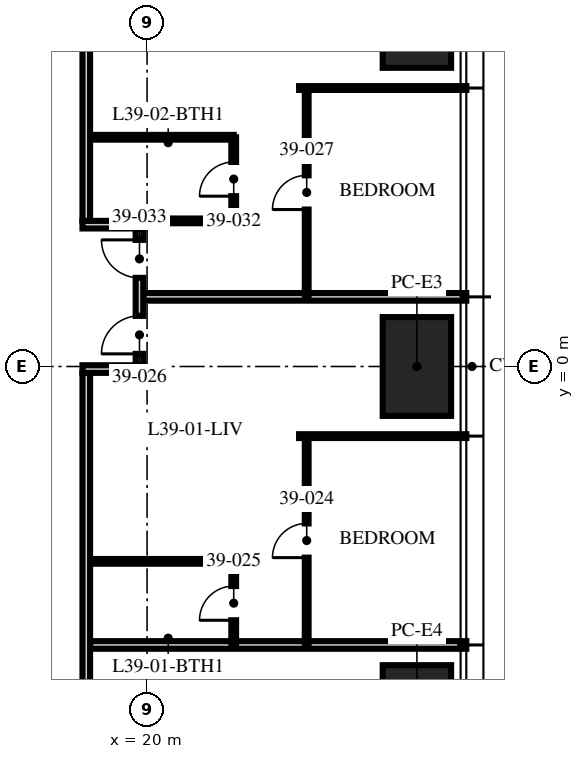
"""IFC4 building model, lengths in metres.
Left out: names, types, materials, properties, quantities, classifications, styles, units other than length and angle.
Written with IfcOpenShell. Run it as: python <this file> out.ifc"""

import sys

from ifc_helpers import new_model, si_unit, direction, frame, frame_2d, origin, origin_2d, place, context, subcontext, project, spatial, rectangle, extrude, element, fill, save


model = new_model("IFC4")
c1 = context("Model", 3, precision=1e-05, world=origin(), true_north=direction((0.0, 1.0)))
c2 = subcontext(c1, "Body", "Model", "MODEL_VIEW")
j1 = project(units=[si_unit("LENGTHUNIT", "METRE"), si_unit("PLANEANGLEUNIT", "RADIAN")], contexts=[c1])
p1 = place(None, origin())
s1 = spatial("IfcSite", under=j1, at=p1, CompositionType="ELEMENT")
p2 = place(p1, origin())
s2 = spatial("IfcBuilding", under=s1, at=p2, CompositionType="ELEMENT")
p3 = place(p2, frame((0.0, 0.0, 156.0)))
s3 = spatial("IfcBuildingStorey", under=s2, at=p3, CompositionType="ELEMENT", Elevation=156.0)
for number, where, z_axis, x_axis in (
    (1, (27.1, 9.16, 0.0), (0.0, 0.0, 1.0), (0.0, 1.0, 0.0)),
    (2, (27.1, 0.0, 0.0), (0.0, 0.0, 1.0), (0.0, 1.0, 0.0)),
    (3, (27.1, -9.16, 0.0), (0.0, 0.0, 1.0), (0.0, 1.0, 0.0)),
):
    element("IfcColumn", number, at=place(p3, frame(where, z_axis=z_axis, x_axis=x_axis)), inside=s3, PredefinedType="COLUMN", context=c2, shape_type="SweptSolid", body=[
        extrude(rectangle(XDim=2.6, YDim=1.8, at=origin_2d()), origin(), (0.0, 0.0, 1.0), 3.75),
    ])
p4 = place(p3, frame((18.5, -7.328, 0.0), z_axis=(0.0, 0.0, 1.0), x_axis=(1.0, 0.0, 0.0)))
e4 = element("IfcWall", 4, at=p4, inside=s3, PredefinedType="PARTITIONING", context=c2, shape_type="SweptSolid", body=[
    extrude(rectangle(XDim=9.9, YDim=0.2, at=frame_2d((4.95, 0.0))), origin(), (0.0, 0.0, 1.0), 2.81),
])
p5 = place(p3, frame((24.0, -1.832, 0.0), z_axis=(0.0, 0.0, 1.0), x_axis=(1.0, 0.0, 0.0)))
e5 = element("IfcWall", 5, at=p5, inside=s3, PredefinedType="PARTITIONING", context=c2, shape_type="SweptSolid", body=[
    extrude(rectangle(XDim=4.4, YDim=0.1, at=frame_2d((2.2, 0.0))), origin(), (0.0, 0.0, 1.0), 2.81),
])
p6 = place(p3, frame((19.9, 1.832, 0.0), z_axis=(0.0, 0.0, 1.0), x_axis=(1.0, 0.0, 0.0)))
e6 = element("IfcWall", 6, at=p6, inside=s3, PredefinedType="PARTITIONING", context=c2, shape_type="SweptSolid", body=[
    extrude(rectangle(XDim=8.5, YDim=0.2, at=frame_2d((4.25, 0.0))), origin(), (0.0, 0.0, 1.0), 2.81),
])
p7 = place(p3, frame((24.0, 7.328, 0.0), z_axis=(0.0, 0.0, 1.0), x_axis=(1.0, 0.0, 0.0)))
e7 = element("IfcWall", 7, at=p7, inside=s3, PredefinedType="PARTITIONING", context=c2, shape_type="SweptSolid", body=[
    extrude(rectangle(XDim=4.4, YDim=0.1, at=frame_2d((2.2, 0.0))), origin(), (0.0, 0.0, 1.0), 2.81),
])
p8 = place(p3, frame((24.2, -7.328, 0.0), z_axis=(0.0, 0.0, 1.0), x_axis=(0.0, 1.0, 0.0)))
e8 = element("IfcWall", 8, at=p8, inside=s3, PredefinedType="PARTITIONING", context=c2, shape_type="SweptSolid", body=[
    extrude(rectangle(XDim=5.496, YDim=0.1, at=frame_2d((2.748, 0.0))), origin(), (0.0, 0.0, 1.0), 2.81),
])
p9 = place(p8, frame((2.298, 0.0, 0.0)))
e9 = element("IfcOpeningElement", 9, at=p9, cuts=e8, PredefinedType="OPENING", context=c2, shape_type="SweptSolid", body=[
    extrude(rectangle(XDim=0.9, YDim=2.1, at=frame_2d((0.45, 1.05))), frame((0.0, 0.06, 0.0), z_axis=(0.0, -1.0, 0.0), x_axis=(1.0, 0.0, 0.0)), (0.0, 0.0, 1.0), 0.12),
])
p10 = place(p3, frame((22.28, -7.328, 0.0), z_axis=(0.0, 0.0, 1.0), x_axis=(0.0, 1.0, 0.0)))
e10 = element("IfcWall", 10, at=p10, inside=s3, PredefinedType="PARTITIONING", context=c2, shape_type="SweptSolid", body=[
    extrude(rectangle(XDim=2.2, YDim=0.125, at=frame_2d((1.1, 0.0))), origin(), (0.0, 0.0, 1.0), 3.5),
])
p11 = place(p10, frame((0.65, 0.0, 0.0)))
e11 = element("IfcOpeningElement", 11, at=p11, cuts=e10, PredefinedType="OPENING", context=c2, shape_type="SweptSolid", body=[
    extrude(rectangle(XDim=0.9, YDim=2.1, at=frame_2d((0.45, 1.05))), frame((0.0, 0.073, 0.0), z_axis=(0.0, -1.0, 0.0), x_axis=(1.0, 0.0, 0.0)), (0.0, 0.0, 1.0), 0.145),
])
p12 = place(p3, frame((18.5, -5.128, 0.0), z_axis=(0.0, 0.0, 1.0), x_axis=(1.0, 0.0, 0.0)))
e12 = element("IfcWall", 12, at=p12, inside=s3, PredefinedType="PARTITIONING", context=c2, shape_type="SweptSolid", body=[
    extrude(rectangle(XDim=3.78, YDim=0.125, at=frame_2d((1.89, 0.0))), origin(), (0.0, 0.0, 1.0), 3.5),
])
p13 = place(p3, frame((24.2, 1.832, 0.0), z_axis=(0.0, 0.0, 1.0), x_axis=(0.0, 1.0, 0.0)))
e13 = element("IfcWall", 13, at=p13, inside=s3, PredefinedType="PARTITIONING", context=c2, shape_type="SweptSolid", body=[
    extrude(rectangle(XDim=5.496, YDim=0.1, at=frame_2d((2.748, 0.0))), origin(), (0.0, 0.0, 1.0), 2.81),
])
p14 = place(p13, frame((2.298, 0.0, 0.0)))
e14 = element("IfcOpeningElement", 14, at=p14, cuts=e13, PredefinedType="OPENING", context=c2, shape_type="SweptSolid", body=[
    extrude(rectangle(XDim=0.9, YDim=2.1, at=frame_2d((0.45, 1.05))), frame((0.0, 0.06, 0.0), z_axis=(0.0, -1.0, 0.0), x_axis=(1.0, 0.0, 0.0)), (0.0, 0.0, 1.0), 0.12),
])
p15 = place(p3, frame((22.28, 3.832, 0.0), z_axis=(0.0, 0.0, 1.0), x_axis=(0.0, 1.0, 0.0)))
e15 = element("IfcWall", 15, at=p15, inside=s3, PredefinedType="PARTITIONING", context=c2, shape_type="SweptSolid", body=[
    extrude(rectangle(XDim=2.2, YDim=0.125, at=frame_2d((1.1, 0.0))), origin(), (0.0, 0.0, 1.0), 2.81),
])
p16 = place(p15, frame((0.65, 0.0, 0.0)))
e16 = element("IfcOpeningElement", 16, at=p16, cuts=e15, PredefinedType="OPENING", context=c2, shape_type="SweptSolid", body=[
    extrude(rectangle(XDim=0.9, YDim=2.1, at=frame_2d((0.45, 1.05))), frame((0.0, 0.073, 0.0), z_axis=(0.0, -1.0, 0.0), x_axis=(1.0, 0.0, 0.0)), (0.0, 0.0, 1.0), 0.145),
])
p17 = place(p3, frame((19.97, 3.832, 0.0), z_axis=(0.0, 0.0, 1.0), x_axis=(1.0, 0.0, 0.0)))
e17 = element("IfcWall", 17, at=p17, inside=s3, PredefinedType="PARTITIONING", context=c2, shape_type="SweptSolid", body=[
    extrude(rectangle(XDim=2.31, YDim=0.125, at=frame_2d((1.155, 0.0))), origin(), (0.0, 0.0, 1.0), 3.5),
])
p18 = place(p3, frame((18.5, 6.032, 0.0), z_axis=(0.0, 0.0, 1.0), x_axis=(1.0, 0.0, 0.0)))
e18 = element("IfcWall", 18, at=p18, inside=s3, PredefinedType="PARTITIONING", context=c2, shape_type="SweptSolid", body=[
    extrude(rectangle(XDim=3.78, YDim=0.125, at=frame_2d((1.89, 0.0))), origin(), (0.0, 0.0, 1.0), 3.5),
])
p19 = place(p3, frame((18.4, -18.3, 0.0), z_axis=(0.0, 0.0, 1.0), x_axis=(0.0, 1.0, 0.0)))
e19 = element("IfcWall", 19, at=p19, inside=s3, PredefinedType="PARTITIONING", context=c2, shape_type="SweptSolid", body=[
    extrude(rectangle(XDim=18.132, YDim=0.2, at=frame_2d((9.066, 0.0))), origin(), (0.0, 0.0, 1.0), 2.3),
])
p20 = place(p3, frame((18.3, -0.068, 0.0), z_axis=(0.0, 0.0, 1.0), x_axis=(1.0, 0.0, 0.0)))
e20 = element("IfcWall", 20, at=p20, inside=s3, PredefinedType="PARTITIONING", context=c2, shape_type="SweptSolid", body=[
    extrude(rectangle(XDim=1.6, YDim=0.2, at=frame_2d((0.8, 0.0))), origin(), (0.0, 0.0, 1.0), 2.7),
])
p21 = place(p3, frame((18.3, 3.732, 0.0), z_axis=(0.0, 0.0, 1.0), x_axis=(1.0, 0.0, 0.0)))
e21 = element("IfcWall", 21, at=p21, inside=s3, PredefinedType="PARTITIONING", context=c2, shape_type="SweptSolid", body=[
    extrude(rectangle(XDim=1.6, YDim=0.2, at=frame_2d((0.8, 0.0))), origin(), (0.0, 0.0, 1.0), 3.5),
])
p22 = place(p3, frame((19.8, 0.032, 0.0), z_axis=(0.0, 0.0, 1.0), x_axis=(0.0, 1.0, 0.0)))
e22 = element("IfcWall", 22, at=p22, inside=s3, PredefinedType="PARTITIONING", context=c2, shape_type="SweptSolid", body=[
    extrude(rectangle(XDim=3.6, YDim=0.2, at=frame_2d((1.8, 0.0))), origin(), (0.0, 0.0, 1.0), 2.7),
])
p23 = place(p22, frame((0.3, 0.0, 0.0)))
e23 = element("IfcOpeningElement", 23, at=p23, cuts=e22, PredefinedType="OPENING", context=c2, shape_type="SweptSolid", body=[
    extrude(rectangle(XDim=1.0, YDim=2.2, at=frame_2d((0.5, 1.1))), frame((0.0, 0.11, 0.0), z_axis=(0.0, -1.0, 0.0), x_axis=(1.0, 0.0, 0.0)), (0.0, 0.0, 1.0), 0.22),
])
p24 = place(p22, frame((2.3, 0.0, 0.0)))
e24 = element("IfcOpeningElement", 24, at=p24, cuts=e22, PredefinedType="OPENING", context=c2, shape_type="SweptSolid", body=[
    extrude(rectangle(XDim=1.0, YDim=2.2, at=frame_2d((0.5, 1.1))), frame((0.0, 0.11, 0.0), z_axis=(0.0, -1.0, 0.0), x_axis=(1.0, 0.0, 0.0)), (0.0, 0.0, 1.0), 0.22),
])
p25 = place(p3, frame((18.4, 3.832, 0.0), z_axis=(0.0, 0.0, 1.0), x_axis=(0.0, 1.0, 0.0)))
e25 = element("IfcWall", 25, at=p25, inside=s3, PredefinedType="PARTITIONING", context=c2, shape_type="SweptSolid", body=[
    extrude(rectangle(XDim=12.868, YDim=0.2, at=frame_2d((6.434, 0.0))), origin(), (0.0, 0.0, 1.0), 2.7),
])
p26 = place(p9, origin())
e26 = element("IfcDoor", 26, at=p26, inside=s3, OperationType="SINGLE_SWING_LEFT", PredefinedType="DOOR", context=c2, shape_type="SweptSolid", body=[
    extrude(rectangle(XDim=0.9, YDim=2.1, at=frame_2d((0.45, 1.05))), frame((0.0, 0.025, 0.0), z_axis=(0.0, -1.0, 0.0), x_axis=(1.0, 0.0, 0.0)), (0.0, 0.0, 1.0), 0.05),
])
fill(e9, e26)
p27 = place(p11, origin())
e27 = element("IfcDoor", 27, at=p27, inside=s3, OperationType="SINGLE_SWING_LEFT", PredefinedType="DOOR", context=c2, shape_type="SweptSolid", body=[
    extrude(rectangle(XDim=0.9, YDim=2.1, at=frame_2d((0.45, 1.05))), frame((0.0, 0.025, 0.0), z_axis=(0.0, -1.0, 0.0), x_axis=(1.0, 0.0, 0.0)), (0.0, 0.0, 1.0), 0.05),
])
fill(e11, e27)
p28 = place(p23, origin())
e28 = element("IfcDoor", 28, at=p28, inside=s3, OperationType="SINGLE_SWING_LEFT", PredefinedType="DOOR", context=c2, shape_type="SweptSolid", body=[
    extrude(rectangle(XDim=1.0, YDim=2.2, at=frame_2d((0.5, 1.1))), frame((0.0, 0.025, 0.0), z_axis=(0.0, -1.0, 0.0), x_axis=(1.0, 0.0, 0.0)), (0.0, 0.0, 1.0), 0.05),
])
fill(e23, e28)
p29 = place(p14, origin())
e29 = element("IfcDoor", 29, at=p29, inside=s3, OperationType="SINGLE_SWING_LEFT", PredefinedType="DOOR", context=c2, shape_type="SweptSolid", body=[
    extrude(rectangle(XDim=0.9, YDim=2.1, at=frame_2d((0.45, 1.05))), frame((0.0, 0.025, 0.0), z_axis=(0.0, -1.0, 0.0), x_axis=(1.0, 0.0, 0.0)), (0.0, 0.0, 1.0), 0.05),
])
fill(e14, e29)
p30 = place(p16, origin())
e30 = element("IfcDoor", 30, at=p30, inside=s3, OperationType="SINGLE_SWING_LEFT", PredefinedType="DOOR", context=c2, shape_type="SweptSolid", body=[
    extrude(rectangle(XDim=0.9, YDim=2.1, at=frame_2d((0.45, 1.05))), frame((0.0, 0.025, 0.0), z_axis=(0.0, -1.0, 0.0), x_axis=(1.0, 0.0, 0.0)), (0.0, 0.0, 1.0), 0.05),
])
fill(e16, e30)
p31 = place(p24, origin())
e31 = element("IfcDoor", 31, at=p31, inside=s3, OperationType="SINGLE_SWING_RIGHT", PredefinedType="DOOR", context=c2, shape_type="SweptSolid", body=[
    extrude(rectangle(XDim=1.0, YDim=2.2, at=frame_2d((0.5, 1.1))), frame((0.0, 0.025, 0.0), z_axis=(0.0, -1.0, 0.0), x_axis=(1.0, 0.0, 0.0)), (0.0, 0.0, 1.0), 0.05),
])
fill(e24, e31)
save(model, sys.argv[1])
